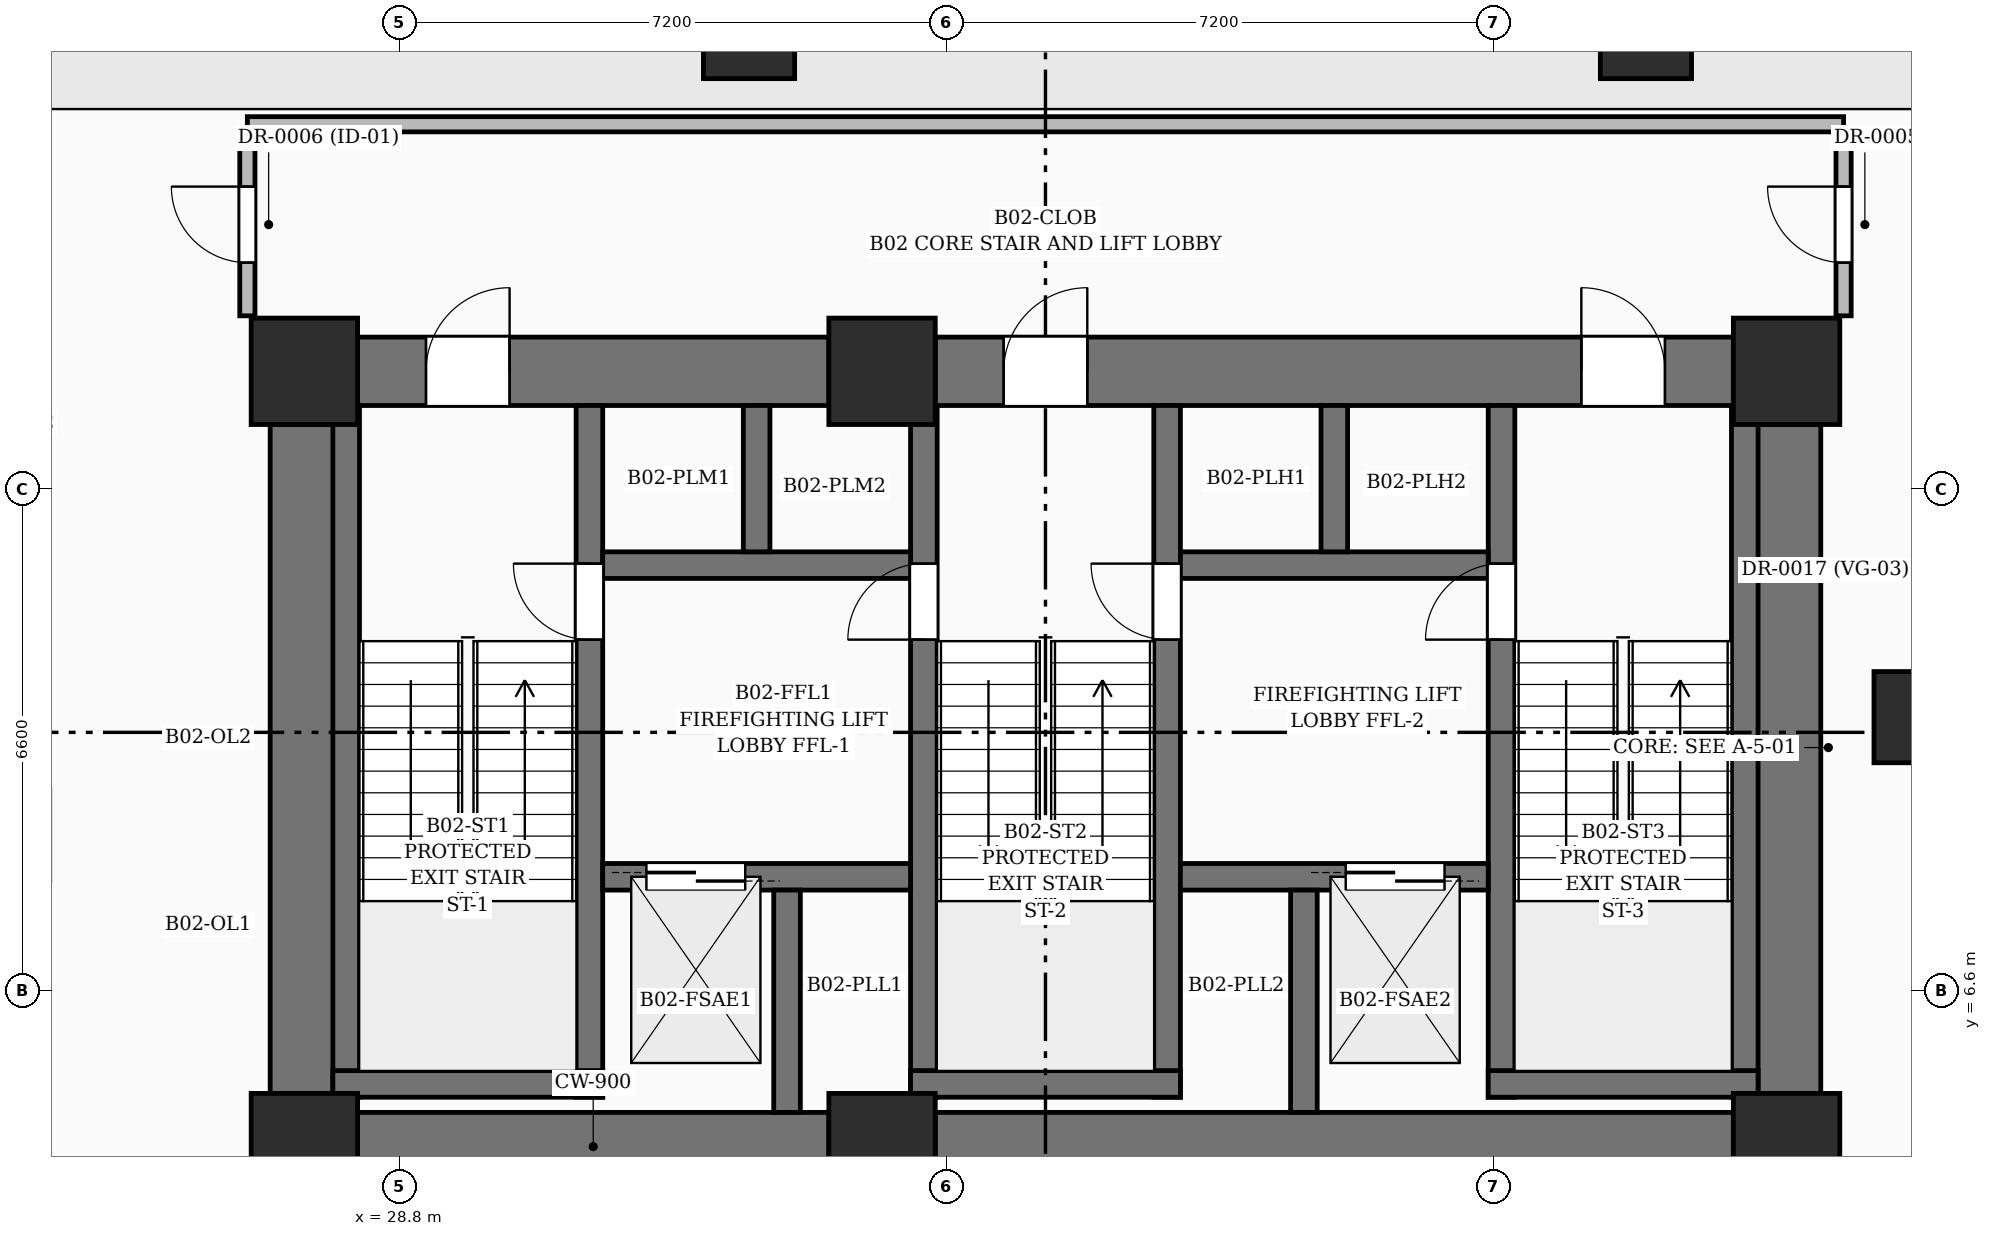
"""IFC4 building model, lengths in metres.
Left out: names, types, materials, properties, quantities, classifications, styles, units other than length and angle.
Written with IfcOpenShell. Run it as: python <this file> out.ifc"""

import sys

from ifc_helpers import new_model, si_unit, direction, frame, frame_2d, origin, origin_2d, place, context, subcontext, project, spatial, rectangle, extrude, element, fill, save


model = new_model("IFC4")
c1 = context("Model", 3, precision=1e-05, world=origin(), true_north=direction((0.0, 1.0)))
c2 = subcontext(c1, "Body", "Model", "MODEL_VIEW")
j1 = project(units=[si_unit("LENGTHUNIT", "METRE"), si_unit("PLANEANGLEUNIT", "RADIAN")], contexts=[c1])
p1 = place(None, origin())
s1 = spatial("IfcSite", under=j1, at=p1, CompositionType="ELEMENT")
p2 = place(p1, origin())
s2 = spatial("IfcBuilding", under=s1, at=p2, CompositionType="ELEMENT")
p3 = place(p2, frame((0.0, 0.0, -9.0)))
s3 = spatial("IfcBuildingStorey", under=s2, at=p3, CompositionType="ELEMENT", Elevation=-9.0)
for number, where, z_axis, x_axis in (
    (1, (27.55, 4.55, 0.0), (0.0, 0.0, 1.0), (1.0, 0.0, 0.0)),
    (2, (35.15, 4.55, 0.0), (0.0, 0.0, 1.0), (1.0, 0.0, 0.0)),
    (3, (47.05, 4.55, 0.0), (0.0, 0.0, 1.0), (1.0, 0.0, 0.0)),
    (4, (27.55, 14.75, 0.0), (0.0, 0.0, 1.0), (1.0, 0.0, 0.0)),
    (5, (35.15, 14.75, 0.0), (0.0, 0.0, 1.0), (1.0, 0.0, 0.0)),
    (6, (47.05, 14.75, 0.0), (0.0, 0.0, 1.0), (1.0, 0.0, 0.0)),
):
    element("IfcColumn", number, at=place(p3, frame(where, z_axis=z_axis, x_axis=x_axis)), inside=s3, PredefinedType="COLUMN", context=c2, shape_type="SweptSolid", body=[
        extrude(rectangle(XDim=1.4, YDim=1.4, at=origin_2d()), origin(), (0.0, 0.0, 1.0), 4.5),
    ])
for number, where, z_axis, x_axis in (
    (7, (48.8, 10.2, 0.0), (0.0, 0.0, 1.0), (1.0, 0.0, 0.0)),
    (8, (45.2, 19.2, 0.0), (0.0, 0.0, 1.0), (1.0, 0.0, 0.0)),
    (9, (33.4, 19.2, 0.0), (0.0, 0.0, 1.0), (1.0, 0.0, 0.0)),
):
    element("IfcColumn", number, at=place(p3, frame(where, z_axis=z_axis, x_axis=x_axis)), inside=s3, PredefinedType="COLUMN", context=c2, shape_type="SweptSolid", body=[
        extrude(rectangle(XDim=1.2, YDim=1.2, at=origin_2d()), origin(), (0.0, 0.0, 1.0), 4.5),
    ])
p4 = place(p3, frame((28.25, 4.55, 0.0), z_axis=(0.0, 0.0, 1.0), x_axis=(1.0, 0.0, 0.0)))
e10 = element("IfcWall", 10, at=p4, inside=s3, PredefinedType="SHEAR", context=c2, shape_type="SweptSolid", body=[
    extrude(rectangle(XDim=6.2, YDim=0.9, at=frame_2d((3.1, 0.0))), origin(), (0.0, 0.0, 1.0), 4.5),
])
p5 = place(p3, frame((35.85, 4.55, 0.0), z_axis=(0.0, 0.0, 1.0), x_axis=(1.0, 0.0, 0.0)))
e11 = element("IfcWall", 11, at=p5, inside=s3, PredefinedType="SHEAR", context=c2, shape_type="SweptSolid", body=[
    extrude(rectangle(XDim=10.5, YDim=0.9, at=frame_2d((5.25, 0.0))), origin(), (0.0, 0.0, 1.0), 4.5),
])
p6 = place(p3, frame((28.25, 14.75, 0.0), z_axis=(0.0, 0.0, 1.0), x_axis=(1.0, 0.0, 0.0)))
e12 = element("IfcWall", 12, at=p6, inside=s3, PredefinedType="SHEAR", context=c2, shape_type="SweptSolid", body=[
    extrude(rectangle(XDim=6.2, YDim=0.9, at=frame_2d((3.1, 0.0))), origin(), (0.0, 0.0, 1.0), 4.5),
])
p7 = place(p6, frame((0.9, 0.0, 0.0)))
e13 = element("IfcOpeningElement", 13, at=p7, cuts=e12, PredefinedType="OPENING", context=c2, shape_type="SweptSolid", body=[
    extrude(rectangle(XDim=1.1, YDim=2.2, at=frame_2d((0.55, 1.1))), frame((0.0, 0.46, 0.0), z_axis=(0.0, -1.0, 0.0), x_axis=(1.0, 0.0, 0.0)), (0.0, 0.0, 1.0), 0.92),
])
p8 = place(p3, frame((35.85, 14.75, 0.0), z_axis=(0.0, 0.0, 1.0), x_axis=(1.0, 0.0, 0.0)))
e14 = element("IfcWall", 14, at=p8, inside=s3, PredefinedType="SHEAR", context=c2, shape_type="SweptSolid", body=[
    extrude(rectangle(XDim=10.5, YDim=0.9, at=frame_2d((5.25, 0.0))), origin(), (0.0, 0.0, 1.0), 4.5),
])
p9 = place(p8, frame((0.9, 0.0, 0.0)))
e15 = element("IfcOpeningElement", 15, at=p9, cuts=e14, PredefinedType="OPENING", context=c2, shape_type="SweptSolid", body=[
    extrude(rectangle(XDim=1.1, YDim=2.2, at=frame_2d((0.55, 1.1))), frame((0.0, 0.46, 0.0), z_axis=(0.0, -1.0, 0.0), x_axis=(1.0, 0.0, 0.0)), (0.0, 0.0, 1.0), 0.92),
])
p10 = place(p8, frame((8.5, 0.0, 0.0)))
e16 = element("IfcOpeningElement", 16, at=p10, cuts=e14, PredefinedType="OPENING", context=c2, shape_type="SweptSolid", body=[
    extrude(rectangle(XDim=1.1, YDim=2.2, at=frame_2d((0.55, 1.1))), frame((0.0, 0.46, 0.0), z_axis=(0.0, -1.0, 0.0), x_axis=(1.0, 0.0, 0.0)), (0.0, 0.0, 1.0), 0.92),
])
for number, where, z_axis, x_axis in (
    (17, (27.55, 5.25, 0.0), (0.0, 0.0, 1.0), (0.0, 1.0, 0.0)),
    (18, (47.05, 5.25, 0.0), (0.0, 0.0, 1.0), (0.0, 1.0, 0.0)),
):
    element("IfcWall", number, at=place(p3, frame(where, z_axis=z_axis, x_axis=x_axis)), inside=s3, PredefinedType="SHEAR", context=c2, shape_type="SweptSolid", body=[
        extrude(rectangle(XDim=8.8, YDim=0.9, at=frame_2d((4.4, 0.0))), origin(), (0.0, 0.0, 1.0), 4.5),
    ])
p11 = place(p3, frame((28.1, 5.2, 0.0), z_axis=(0.0, 0.0, 1.0), x_axis=(0.0, 1.0, 0.0)))
e19 = element("IfcWall", 19, at=p11, inside=s3, PredefinedType="SOLIDWALL", context=c2, shape_type="SweptSolid", body=[
    extrude(rectangle(XDim=9.1, YDim=0.35, at=frame_2d((4.55, 0.0))), origin(), (0.0, 0.0, 1.0), 4.5),
])
p12 = place(p3, frame((31.3, 5.2, 0.0), z_axis=(0.0, 0.0, 1.0), x_axis=(0.0, 1.0, 0.0)))
e20 = element("IfcWall", 20, at=p12, inside=s3, PredefinedType="SOLIDWALL", context=c2, shape_type="SweptSolid", body=[
    extrude(rectangle(XDim=9.1, YDim=0.35, at=frame_2d((4.55, 0.0))), origin(), (0.0, 0.0, 1.0), 4.5),
])
p13 = place(p12, frame((6.02, 0.0, 0.0)))
e21 = element("IfcOpeningElement", 21, at=p13, cuts=e20, PredefinedType="OPENING", context=c2, shape_type="SweptSolid", body=[
    extrude(rectangle(XDim=1.0, YDim=2.15, at=frame_2d((0.5, 1.075))), frame((0.0, 0.185, 0.0), z_axis=(0.0, -1.0, 0.0), x_axis=(1.0, 0.0, 0.0)), (0.0, 0.0, 1.0), 0.37),
])
p14 = place(p3, frame((27.925, 5.375, 0.0), z_axis=(0.0, 0.0, 1.0), x_axis=(1.0, 0.0, 0.0)))
e22 = element("IfcWall", 22, at=p14, inside=s3, PredefinedType="SOLIDWALL", context=c2, shape_type="SweptSolid", body=[
    extrude(rectangle(XDim=3.55, YDim=0.35, at=frame_2d((1.775, 0.0))), origin(), (0.0, 0.0, 1.0), 4.5),
])
p15 = place(p3, frame((35.7, 5.2, 0.0), z_axis=(0.0, 0.0, 1.0), x_axis=(0.0, 1.0, 0.0)))
e23 = element("IfcWall", 23, at=p15, inside=s3, PredefinedType="SOLIDWALL", context=c2, shape_type="SweptSolid", body=[
    extrude(rectangle(XDim=9.1, YDim=0.35, at=frame_2d((4.55, 0.0))), origin(), (0.0, 0.0, 1.0), 4.5),
])
p16 = place(p15, frame((6.02, 0.0, 0.0)))
e24 = element("IfcOpeningElement", 24, at=p16, cuts=e23, PredefinedType="OPENING", context=c2, shape_type="SweptSolid", body=[
    extrude(rectangle(XDim=1.0, YDim=2.15, at=frame_2d((0.5, 1.075))), frame((0.0, 0.185, 0.0), z_axis=(0.0, -1.0, 0.0), x_axis=(1.0, 0.0, 0.0)), (0.0, 0.0, 1.0), 0.37),
])
p17 = place(p3, frame((38.9, 5.2, 0.0), z_axis=(0.0, 0.0, 1.0), x_axis=(0.0, 1.0, 0.0)))
e25 = element("IfcWall", 25, at=p17, inside=s3, PredefinedType="SOLIDWALL", context=c2, shape_type="SweptSolid", body=[
    extrude(rectangle(XDim=9.1, YDim=0.35, at=frame_2d((4.55, 0.0))), origin(), (0.0, 0.0, 1.0), 4.5),
])
p18 = place(p17, frame((6.02, 0.0, 0.0)))
e26 = element("IfcOpeningElement", 26, at=p18, cuts=e25, PredefinedType="OPENING", context=c2, shape_type="SweptSolid", body=[
    extrude(rectangle(XDim=1.0, YDim=2.15, at=frame_2d((0.5, 1.075))), frame((0.0, 0.185, 0.0), z_axis=(0.0, -1.0, 0.0), x_axis=(1.0, 0.0, 0.0)), (0.0, 0.0, 1.0), 0.37),
])
p19 = place(p3, frame((35.525, 5.375, 0.0), z_axis=(0.0, 0.0, 1.0), x_axis=(1.0, 0.0, 0.0)))
e27 = element("IfcWall", 27, at=p19, inside=s3, PredefinedType="SOLIDWALL", context=c2, shape_type="SweptSolid", body=[
    extrude(rectangle(XDim=3.55, YDim=0.35, at=frame_2d((1.775, 0.0))), origin(), (0.0, 0.0, 1.0), 4.5),
])
p20 = place(p3, frame((43.3, 5.2, 0.0), z_axis=(0.0, 0.0, 1.0), x_axis=(0.0, 1.0, 0.0)))
e28 = element("IfcWall", 28, at=p20, inside=s3, PredefinedType="SOLIDWALL", context=c2, shape_type="SweptSolid", body=[
    extrude(rectangle(XDim=9.1, YDim=0.35, at=frame_2d((4.55, 0.0))), origin(), (0.0, 0.0, 1.0), 4.5),
])
p21 = place(p20, frame((6.02, 0.0, 0.0)))
e29 = element("IfcOpeningElement", 29, at=p21, cuts=e28, PredefinedType="OPENING", context=c2, shape_type="SweptSolid", body=[
    extrude(rectangle(XDim=1.0, YDim=2.15, at=frame_2d((0.5, 1.075))), frame((0.0, 0.185, 0.0), z_axis=(0.0, -1.0, 0.0), x_axis=(1.0, 0.0, 0.0)), (0.0, 0.0, 1.0), 0.37),
])
p22 = place(p3, frame((46.5, 5.2, 0.0), z_axis=(0.0, 0.0, 1.0), x_axis=(0.0, 1.0, 0.0)))
e30 = element("IfcWall", 30, at=p22, inside=s3, PredefinedType="SOLIDWALL", context=c2, shape_type="SweptSolid", body=[
    extrude(rectangle(XDim=9.1, YDim=0.35, at=frame_2d((4.55, 0.0))), origin(), (0.0, 0.0, 1.0), 4.5),
])
p23 = place(p3, frame((43.125, 5.375, 0.0), z_axis=(0.0, 0.0, 1.0), x_axis=(1.0, 0.0, 0.0)))
e31 = element("IfcWall", 31, at=p23, inside=s3, PredefinedType="SOLIDWALL", context=c2, shape_type="SweptSolid", body=[
    extrude(rectangle(XDim=3.55, YDim=0.35, at=frame_2d((1.775, 0.0))), origin(), (0.0, 0.0, 1.0), 4.5),
])
p24 = place(p3, frame((31.475, 8.1, 0.0), z_axis=(0.0, 0.0, 1.0), x_axis=(1.0, 0.0, 0.0)))
e32 = element("IfcWall", 32, at=p24, inside=s3, PredefinedType="SOLIDWALL", context=c2, shape_type="SweptSolid", body=[
    extrude(rectangle(XDim=4.05, YDim=0.35, at=frame_2d((2.025, 0.0))), origin(), (0.0, 0.0, 1.0), 4.5),
])
p25 = place(p24, frame((0.575, 0.0, 0.0)))
e33 = element("IfcOpeningElement", 33, at=p25, cuts=e32, PredefinedType="OPENING", context=c2, shape_type="SweptSolid", body=[
    extrude(rectangle(XDim=1.3, YDim=2.25, at=frame_2d((0.65, 1.125))), frame((0.0, 0.185, 0.0), z_axis=(0.0, -1.0, 0.0), x_axis=(1.0, 0.0, 0.0)), (0.0, 0.0, 1.0), 0.37),
])
p26 = place(p3, frame((39.075, 8.1, 0.0), z_axis=(0.0, 0.0, 1.0), x_axis=(1.0, 0.0, 0.0)))
e34 = element("IfcWall", 34, at=p26, inside=s3, PredefinedType="SOLIDWALL", context=c2, shape_type="SweptSolid", body=[
    extrude(rectangle(XDim=4.05, YDim=0.35, at=frame_2d((2.025, 0.0))), origin(), (0.0, 0.0, 1.0), 4.5),
])
p27 = place(p26, frame((2.175, 0.0, 0.0)))
e35 = element("IfcOpeningElement", 35, at=p27, cuts=e34, PredefinedType="OPENING", context=c2, shape_type="SweptSolid", body=[
    extrude(rectangle(XDim=1.3, YDim=2.25, at=frame_2d((0.65, 1.125))), frame((0.0, 0.185, 0.0), z_axis=(0.0, -1.0, 0.0), x_axis=(1.0, 0.0, 0.0)), (0.0, 0.0, 1.0), 0.37),
])
for number, where, z_axis, x_axis in (
    (36, (33.9, 5.0, 0.0), (0.0, 0.0, 1.0), (0.0, 1.0, 0.0)),
    (37, (40.7, 5.0, 0.0), (0.0, 0.0, 1.0), (0.0, 1.0, 0.0)),
):
    element("IfcWall", number, at=place(p3, frame(where, z_axis=z_axis, x_axis=x_axis)), inside=s3, PredefinedType="SOLIDWALL", context=c2, shape_type="SweptSolid", body=[
        extrude(rectangle(XDim=2.925, YDim=0.35, at=frame_2d((1.462, 0.0))), origin(), (0.0, 0.0, 1.0), 4.5),
    ])
p28 = place(p3, frame((31.475, 12.2, 0.0), z_axis=(0.0, 0.0, 1.0), x_axis=(1.0, 0.0, 0.0)))
e38 = element("IfcWall", 38, at=p28, inside=s3, PredefinedType="SOLIDWALL", context=c2, shape_type="SweptSolid", body=[
    extrude(rectangle(XDim=4.05, YDim=0.35, at=frame_2d((2.025, 0.0))), origin(), (0.0, 0.0, 1.0), 4.5),
])
p29 = place(p3, frame((33.5, 12.375, 0.0), z_axis=(0.0, 0.0, 1.0), x_axis=(0.0, 1.0, 0.0)))
e39 = element("IfcWall", 39, at=p29, inside=s3, PredefinedType="SOLIDWALL", context=c2, shape_type="SweptSolid", body=[
    extrude(rectangle(XDim=1.925, YDim=0.35, at=frame_2d((0.962, 0.0))), origin(), (0.0, 0.0, 1.0), 4.5),
])
p30 = place(p3, frame((39.075, 12.2, 0.0), z_axis=(0.0, 0.0, 1.0), x_axis=(1.0, 0.0, 0.0)))
e40 = element("IfcWall", 40, at=p30, inside=s3, PredefinedType="SOLIDWALL", context=c2, shape_type="SweptSolid", body=[
    extrude(rectangle(XDim=4.05, YDim=0.35, at=frame_2d((2.025, 0.0))), origin(), (0.0, 0.0, 1.0), 4.5),
])
p31 = place(p3, frame((41.1, 12.375, 0.0), z_axis=(0.0, 0.0, 1.0), x_axis=(0.0, 1.0, 0.0)))
e41 = element("IfcWall", 41, at=p31, inside=s3, PredefinedType="SOLIDWALL", context=c2, shape_type="SweptSolid", body=[
    extrude(rectangle(XDim=1.925, YDim=0.35, at=frame_2d((0.962, 0.0))), origin(), (0.0, 0.0, 1.0), 4.5),
])
p32 = place(p3, frame((26.8, 18.0, 0.0), z_axis=(0.0, 0.0, 1.0), x_axis=(1.0, 0.0, 0.0)))
e42 = element("IfcWall", 42, at=p32, inside=s3, PredefinedType="PARTITIONING", context=c2, shape_type="SweptSolid", body=[
    extrude(rectangle(XDim=21.0, YDim=0.2, at=frame_2d((10.5, 0.0))), origin(), (0.0, 0.0, 1.0), 4.2),
])
p33 = place(p3, frame((26.8, 15.48, 0.0), z_axis=(0.0, 0.0, 1.0), x_axis=(0.0, 1.0, 0.0)))
e43 = element("IfcWall", 43, at=p33, inside=s3, PredefinedType="PARTITIONING", context=c2, shape_type="SweptSolid", body=[
    extrude(rectangle(XDim=2.41, YDim=0.2, at=frame_2d((1.205, 0.0))), origin(), (0.0, 0.0, 1.0), 4.2),
])
p34 = place(p33, frame((0.7, 0.0, 0.0)))
e44 = element("IfcOpeningElement", 44, at=p34, cuts=e43, PredefinedType="OPENING", context=c2, shape_type="SweptSolid", body=[
    extrude(rectangle(XDim=1.0, YDim=2.2, at=frame_2d((0.5, 1.1))), frame((0.0, 0.11, 0.0), z_axis=(0.0, -1.0, 0.0), x_axis=(1.0, 0.0, 0.0)), (0.0, 0.0, 1.0), 0.22),
])
p35 = place(p3, frame((47.8, 15.48, 0.0), z_axis=(0.0, 0.0, 1.0), x_axis=(0.0, 1.0, 0.0)))
e45 = element("IfcWall", 45, at=p35, inside=s3, PredefinedType="PARTITIONING", context=c2, shape_type="SweptSolid", body=[
    extrude(rectangle(XDim=2.41, YDim=0.2, at=frame_2d((1.205, 0.0))), origin(), (0.0, 0.0, 1.0), 4.2),
])
p36 = place(p35, frame((0.7, 0.0, 0.0)))
e46 = element("IfcOpeningElement", 46, at=p36, cuts=e45, PredefinedType="OPENING", context=c2, shape_type="SweptSolid", body=[
    extrude(rectangle(XDim=1.0, YDim=2.2, at=frame_2d((0.5, 1.1))), frame((0.0, 0.11, 0.0), z_axis=(0.0, -1.0, 0.0), x_axis=(1.0, 0.0, 0.0)), (0.0, 0.0, 1.0), 0.22),
])
p37 = place(p7, origin())
e47 = element("IfcDoor", 47, at=p37, inside=s3, OperationType="SINGLE_SWING_RIGHT", PredefinedType="DOOR", context=c2, shape_type="SweptSolid", body=[
    extrude(rectangle(XDim=1.1, YDim=2.2, at=frame_2d((0.55, 1.1))), frame((0.0, 0.025, 0.0), z_axis=(0.0, -1.0, 0.0), x_axis=(1.0, 0.0, 0.0)), (0.0, 0.0, 1.0), 0.05),
])
fill(e13, e47)
p38 = place(p9, origin())
e48 = element("IfcDoor", 48, at=p38, inside=s3, OperationType="SINGLE_SWING_RIGHT", PredefinedType="DOOR", context=c2, shape_type="SweptSolid", body=[
    extrude(rectangle(XDim=1.1, YDim=2.2, at=frame_2d((0.55, 1.1))), frame((0.0, 0.025, 0.0), z_axis=(0.0, -1.0, 0.0), x_axis=(1.0, 0.0, 0.0)), (0.0, 0.0, 1.0), 0.05),
])
fill(e15, e48)
p39 = place(p10, origin())
e49 = element("IfcDoor", 49, at=p39, inside=s3, OperationType="SINGLE_SWING_LEFT", PredefinedType="DOOR", context=c2, shape_type="SweptSolid", body=[
    extrude(rectangle(XDim=1.1, YDim=2.2, at=frame_2d((0.55, 1.1))), frame((0.0, 0.025, 0.0), z_axis=(0.0, -1.0, 0.0), x_axis=(1.0, 0.0, 0.0)), (0.0, 0.0, 1.0), 0.05),
])
fill(e16, e49)
p40 = place(p13, origin())
e50 = element("IfcDoor", 50, at=p40, inside=s3, OperationType="SINGLE_SWING_RIGHT", PredefinedType="DOOR", context=c2, shape_type="SweptSolid", body=[
    extrude(rectangle(XDim=1.0, YDim=2.15, at=frame_2d((0.5, 1.075))), frame((0.0, 0.025, 0.0), z_axis=(0.0, -1.0, 0.0), x_axis=(1.0, 0.0, 0.0)), (0.0, 0.0, 1.0), 0.05),
])
fill(e21, e50)
p41 = place(p16, origin())
e51 = element("IfcDoor", 51, at=p41, inside=s3, OperationType="SINGLE_SWING_LEFT", PredefinedType="DOOR", context=c2, shape_type="SweptSolid", body=[
    extrude(rectangle(XDim=1.0, YDim=2.15, at=frame_2d((0.5, 1.075))), frame((0.0, 0.025, 0.0), z_axis=(0.0, -1.0, 0.0), x_axis=(1.0, 0.0, 0.0)), (0.0, 0.0, 1.0), 0.05),
])
fill(e24, e51)
p42 = place(p18, origin())
e52 = element("IfcDoor", 52, at=p42, inside=s3, OperationType="SINGLE_SWING_RIGHT", PredefinedType="DOOR", context=c2, shape_type="SweptSolid", body=[
    extrude(rectangle(XDim=1.0, YDim=2.15, at=frame_2d((0.5, 1.075))), frame((0.0, 0.025, 0.0), z_axis=(0.0, -1.0, 0.0), x_axis=(1.0, 0.0, 0.0)), (0.0, 0.0, 1.0), 0.05),
])
fill(e26, e52)
p43 = place(p21, origin())
e53 = element("IfcDoor", 53, at=p43, inside=s3, OperationType="SINGLE_SWING_LEFT", PredefinedType="DOOR", context=c2, shape_type="SweptSolid", body=[
    extrude(rectangle(XDim=1.0, YDim=2.15, at=frame_2d((0.5, 1.075))), frame((0.0, 0.025, 0.0), z_axis=(0.0, -1.0, 0.0), x_axis=(1.0, 0.0, 0.0)), (0.0, 0.0, 1.0), 0.05),
])
fill(e29, e53)
p44 = place(p25, origin())
e54 = element("IfcDoor", 54, at=p44, inside=s3, OperationType="DOUBLE_DOOR_SLIDING", PredefinedType="DOOR", context=c2, shape_type="SweptSolid", body=[
    extrude(rectangle(XDim=1.3, YDim=2.25, at=frame_2d((0.65, 1.125))), frame((0.0, 0.025, 0.0), z_axis=(0.0, -1.0, 0.0), x_axis=(1.0, 0.0, 0.0)), (0.0, 0.0, 1.0), 0.05),
])
fill(e33, e54)
p45 = place(p27, origin())
e55 = element("IfcDoor", 55, at=p45, inside=s3, OperationType="DOUBLE_DOOR_SLIDING", PredefinedType="DOOR", context=c2, shape_type="SweptSolid", body=[
    extrude(rectangle(XDim=1.3, YDim=2.25, at=frame_2d((0.65, 1.125))), frame((0.0, 0.025, 0.0), z_axis=(0.0, -1.0, 0.0), x_axis=(1.0, 0.0, 0.0)), (0.0, 0.0, 1.0), 0.05),
])
fill(e35, e55)
p46 = place(p34, origin())
e56 = element("IfcDoor", 56, at=p46, inside=s3, OperationType="SINGLE_SWING_RIGHT", PredefinedType="DOOR", context=c2, shape_type="SweptSolid", body=[
    extrude(rectangle(XDim=1.0, YDim=2.2, at=frame_2d((0.5, 1.1))), frame((0.0, 0.025, 0.0), z_axis=(0.0, -1.0, 0.0), x_axis=(1.0, 0.0, 0.0)), (0.0, 0.0, 1.0), 0.05),
])
fill(e44, e56)
p47 = place(p36, origin())
e57 = element("IfcDoor", 57, at=p47, inside=s3, OperationType="SINGLE_SWING_RIGHT", PredefinedType="DOOR", context=c2, shape_type="SweptSolid", body=[
    extrude(rectangle(XDim=1.0, YDim=2.2, at=frame_2d((0.5, 1.1))), frame((0.0, 0.025, 0.0), z_axis=(0.0, -1.0, 0.0), x_axis=(1.0, 0.0, 0.0)), (0.0, 0.0, 1.0), 0.05),
])
fill(e46, e57)
save(model, sys.argv[1])
